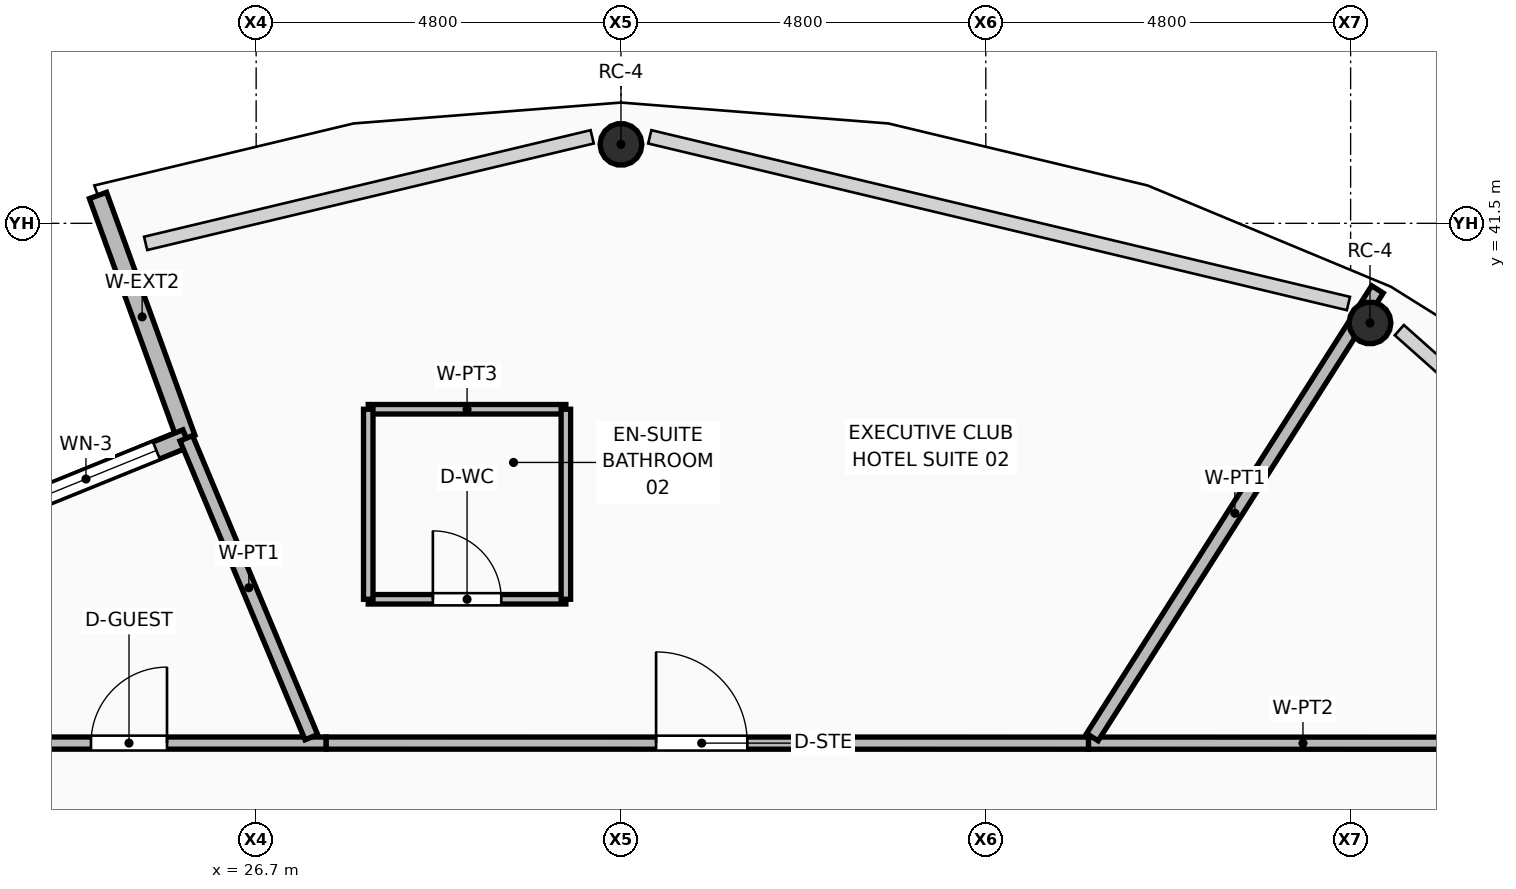
"""IFC4 building model, lengths in metres.
Left out: names, types, materials, properties, quantities, classifications, styles, units other than length and angle.
Written with IfcOpenShell. Run it as: python <this file> out.ifc"""

import sys

from ifc_helpers import new_model, si_unit, direction, frame, frame_2d, origin, origin_2d, place, context, subcontext, project, spatial, rectangle, hollow_circle, extrude, element, fill, save


model = new_model("IFC4")
c1 = context("Model", 3, precision=1e-05, world=origin(), true_north=direction((0.0, 1.0)))
c2 = subcontext(c1, "Body", "Model", "MODEL_VIEW")
j1 = project(units=[si_unit("LENGTHUNIT", "METRE"), si_unit("PLANEANGLEUNIT", "RADIAN")], contexts=[c1])
p1 = place(None, origin())
s1 = spatial("IfcSite", under=j1, at=p1, CompositionType="ELEMENT")
p2 = place(p1, origin())
s2 = spatial("IfcBuilding", under=s1, at=p2, CompositionType="ELEMENT")
p3 = place(p2, frame((0.0, 0.0, 271.35)))
s3 = spatial("IfcBuildingStorey", under=s2, at=p3, CompositionType="ELEMENT", Elevation=271.35)
for number, where, z_axis, x_axis in (
    (1, (41.355, 40.189, 0.0), (-0.011, -0.017, 1.0), (0.836, -0.549, 0.0)),
    (2, (31.5, 42.539, 0.0), (0.0, -0.02, 1.0), (1.0, 0.0, 0.0)),
):
    element("IfcColumn", number, at=place(p3, frame(where, z_axis=z_axis, x_axis=x_axis)), inside=s3, PredefinedType="COLUMN", context=c2, shape_type="SweptSolid", body=[
        extrude(hollow_circle(Radius=0.275, WallThickness=0.025, at=origin_2d()), origin(), (0.0, 0.0, 1.0), 3.571),
    ])
p4 = place(p3, frame((24.619, 41.867, 0.0), z_axis=(0.0, 0.0, 1.0), x_axis=(0.341835319025, -0.939759870747, 0.0)))
e3 = element("IfcWall", 3, at=p4, inside=s3, PredefinedType="SOLIDWALL", context=c2, shape_type="SweptSolid", body=[
    extrude(rectangle(XDim=3.4, YDim=0.24, at=frame_2d((1.7, 0.0))), origin(), (0.0, 0.0, 1.0), 3.57),
])
p5 = place(p3, frame((25.781, 38.672, 0.0), z_axis=(0.0, 0.0, 1.0), x_axis=(-0.926580401984, -0.37609674109, 0.0)))
e4 = element("IfcWall", 4, at=p5, inside=s3, PredefinedType="SOLIDWALL", context=c2, shape_type="SweptSolid", body=[
    extrude(rectangle(XDim=2.85, YDim=0.24, at=frame_2d((1.425, 0.0))), origin(), (0.0, 0.0, 1.0), 3.57),
])
p6 = place(p5, frame((0.425, 0.0, 0.85)))
e5 = element("IfcOpeningElement", 5, at=p6, cuts=e4, PredefinedType="OPENING", context=c2, shape_type="SweptSolid", body=[
    extrude(rectangle(XDim=2.0, YDim=2.4, at=frame_2d((1.0, 1.2))), frame((0.0, 0.13, 0.0), z_axis=(0.0, -1.0, 0.0), x_axis=(1.0, 0.0, 0.0)), (0.0, 0.0, 1.0), 0.26),
])
p7 = place(p3, frame((22.878, 34.662, 0.0), z_axis=(0.0, 0.0, 1.0), x_axis=(1.0, 0.0, 0.0)))
e6 = element("IfcWall", 6, at=p7, inside=s3, PredefinedType="PARTITIONING", context=c2, shape_type="SweptSolid", body=[
    extrude(rectangle(XDim=4.744, YDim=0.16, at=frame_2d((2.372, 0.0))), origin(), (0.0, 0.0, 1.0), 3.55),
])
p8 = place(p7, frame((1.649, 0.0, 0.0)))
e7 = element("IfcOpeningElement", 7, at=p8, cuts=e6, PredefinedType="OPENING", context=c2, shape_type="SweptSolid", body=[
    extrude(rectangle(XDim=1.0, YDim=2.1, at=frame_2d((0.5, 1.05))), frame((0.0, 0.09, 0.0), z_axis=(0.0, -1.0, 0.0), x_axis=(1.0, 0.0, 0.0)), (0.0, 0.0, 1.0), 0.18),
])
p9 = place(p3, frame((27.622, 34.662, 0.0), z_axis=(0.0, 0.0, 1.0), x_axis=(0.999999992594, -0.000121704841, 0.0)))
e8 = element("IfcWall", 8, at=p9, inside=s3, PredefinedType="PARTITIONING", context=c2, shape_type="SweptSolid", body=[
    extrude(rectangle(XDim=10.03, YDim=0.16, at=frame_2d((5.015, 0.0))), origin(), (0.0, 0.0, 1.0), 3.132),
])
p10 = place(p9, frame((4.34, 0.0, 0.0)))
e9 = element("IfcOpeningElement", 9, at=p10, cuts=e8, PredefinedType="OPENING", context=c2, shape_type="SweptSolid", body=[
    extrude(rectangle(XDim=1.2, YDim=2.1, at=frame_2d((0.6, 1.05))), frame((0.0, 0.09, 0.0), z_axis=(0.0, -1.0, 0.0), x_axis=(1.0, 0.0, 0.0)), (0.0, 0.0, 1.0), 0.18),
])
p11 = place(p3, frame((37.652, 34.661, 0.0), z_axis=(0.0, 0.0, 1.0), x_axis=(0.999999985019, -0.000173092732, 0.0)))
e10 = element("IfcWall", 10, at=p11, inside=s3, PredefinedType="PARTITIONING", context=c2, shape_type="SweptSolid", body=[
    extrude(rectangle(XDim=5.642, YDim=0.16, at=frame_2d((2.821, 0.0))), origin(), (0.0, 0.0, 1.0), 3.132),
])
p12 = place(p3, frame((37.702, 34.74, 0.0), z_axis=(0.0, 0.0, 1.0), x_axis=(0.537088099419, 0.843526154581, 0.0)))
e11 = element("IfcWall", 11, at=p12, inside=s3, PredefinedType="PARTITIONING", context=c2, shape_type="SweptSolid", body=[
    extrude(rectangle(XDim=6.984, YDim=0.18, at=frame_2d((3.492, 0.0))), origin(), (0.0, 0.0, 1.0), 3.003),
])
p13 = place(p3, frame((27.426, 34.74, 0.0), z_axis=(0.0, 0.0, 1.0), x_axis=(-0.385940860764, 0.922523523815, 0.0)))
e12 = element("IfcWall", 12, at=p13, inside=s3, PredefinedType="PARTITIONING", context=c2, shape_type="SweptSolid", body=[
    extrude(rectangle(XDim=4.262, YDim=0.18, at=frame_2d((2.131, 0.0))), origin(), (0.0, 0.0, 1.0), 3.55),
])
p14 = place(p3, frame((28.175, 36.554, 0.0), z_axis=(0.0, 0.0, 1.0), x_axis=(1.0, 0.0, 0.0)))
e13 = element("IfcWall", 13, at=p14, inside=s3, PredefinedType="PARTITIONING", context=c2, shape_type="SweptSolid", body=[
    extrude(rectangle(XDim=2.6, YDim=0.125, at=frame_2d((1.3, 0.0))), origin(), (0.0, 0.0, 1.0), 3.55),
])
p15 = place(p14, frame((0.85, 0.0, 0.0)))
e14 = element("IfcOpeningElement", 14, at=p15, cuts=e13, PredefinedType="OPENING", context=c2, shape_type="SweptSolid", body=[
    extrude(rectangle(XDim=0.9, YDim=2.1, at=frame_2d((0.45, 1.05))), frame((0.0, 0.073, 0.0), z_axis=(0.0, -1.0, 0.0), x_axis=(1.0, 0.0, 0.0)), (0.0, 0.0, 1.0), 0.145),
])
p16 = place(p3, frame((28.175, 39.054, 0.0), z_axis=(0.0, 0.0, 1.0), x_axis=(1.0, 0.0, 0.0)))
e15 = element("IfcWall", 15, at=p16, inside=s3, PredefinedType="PARTITIONING", context=c2, shape_type="SweptSolid", body=[
    extrude(rectangle(XDim=2.6, YDim=0.125, at=frame_2d((1.3, 0.0))), origin(), (0.0, 0.0, 1.0), 3.55),
])
for number, where, z_axis, x_axis in (
    (16, (28.175, 36.554, 0.0), (0.0, 0.0, 1.0), (0.0, 1.0, 0.0)),
    (17, (30.775, 36.554, 0.0), (0.0, 0.0, 1.0), (0.0, 1.0, 0.0)),
):
    element("IfcWall", number, at=place(p3, frame(where, z_axis=z_axis, x_axis=x_axis)), inside=s3, PredefinedType="PARTITIONING", context=c2, shape_type="SweptSolid", body=[
        extrude(rectangle(XDim=2.5, YDim=0.125, at=frame_2d((1.25, 0.0))), origin(), (0.0, 0.0, 1.0), 3.55),
    ])
p17 = place(p6, origin())
e18 = element("IfcWindow", 18, at=p17, inside=s3, PartitioningType="SINGLE_PANEL", PredefinedType="WINDOW", context=c2, shape_type="SweptSolid", body=[
    extrude(rectangle(XDim=2.0, YDim=2.4, at=frame_2d((1.0, 1.2))), frame((0.0, 0.03, 0.0), z_axis=(0.0, -1.0, 0.0), x_axis=(1.0, 0.0, 0.0)), (0.0, 0.0, 1.0), 0.06),
])
fill(e5, e18)
p18 = place(p15, origin())
e19 = element("IfcDoor", 19, at=p18, inside=s3, OperationType="SINGLE_SWING_LEFT", PredefinedType="DOOR", context=c2, shape_type="SweptSolid", body=[
    extrude(rectangle(XDim=0.9, YDim=2.1, at=frame_2d((0.45, 1.05))), frame((0.0, 0.025, 0.0), z_axis=(0.0, -1.0, 0.0), x_axis=(1.0, 0.0, 0.0)), (0.0, 0.0, 1.0), 0.05),
])
fill(e14, e19)
p19 = place(p10, origin())
e20 = element("IfcDoor", 20, at=p19, inside=s3, OperationType="SINGLE_SWING_LEFT", PredefinedType="DOOR", context=c2, shape_type="SweptSolid", body=[
    extrude(rectangle(XDim=1.2, YDim=2.1, at=frame_2d((0.6, 1.05))), frame((0.0, 0.025, 0.0), z_axis=(0.0, -1.0, 0.0), x_axis=(1.0, 0.0, 0.0)), (0.0, 0.0, 1.0), 0.05),
])
fill(e9, e20)
p20 = place(p8, origin())
e21 = element("IfcDoor", 21, at=p20, inside=s3, OperationType="SINGLE_SWING_RIGHT", PredefinedType="DOOR", context=c2, shape_type="SweptSolid", body=[
    extrude(rectangle(XDim=1.0, YDim=2.1, at=frame_2d((0.5, 1.05))), frame((0.0, 0.025, 0.0), z_axis=(0.0, -1.0, 0.0), x_axis=(1.0, 0.0, 0.0)), (0.0, 0.0, 1.0), 0.05),
])
fill(e7, e21)
save(model, sys.argv[1])
